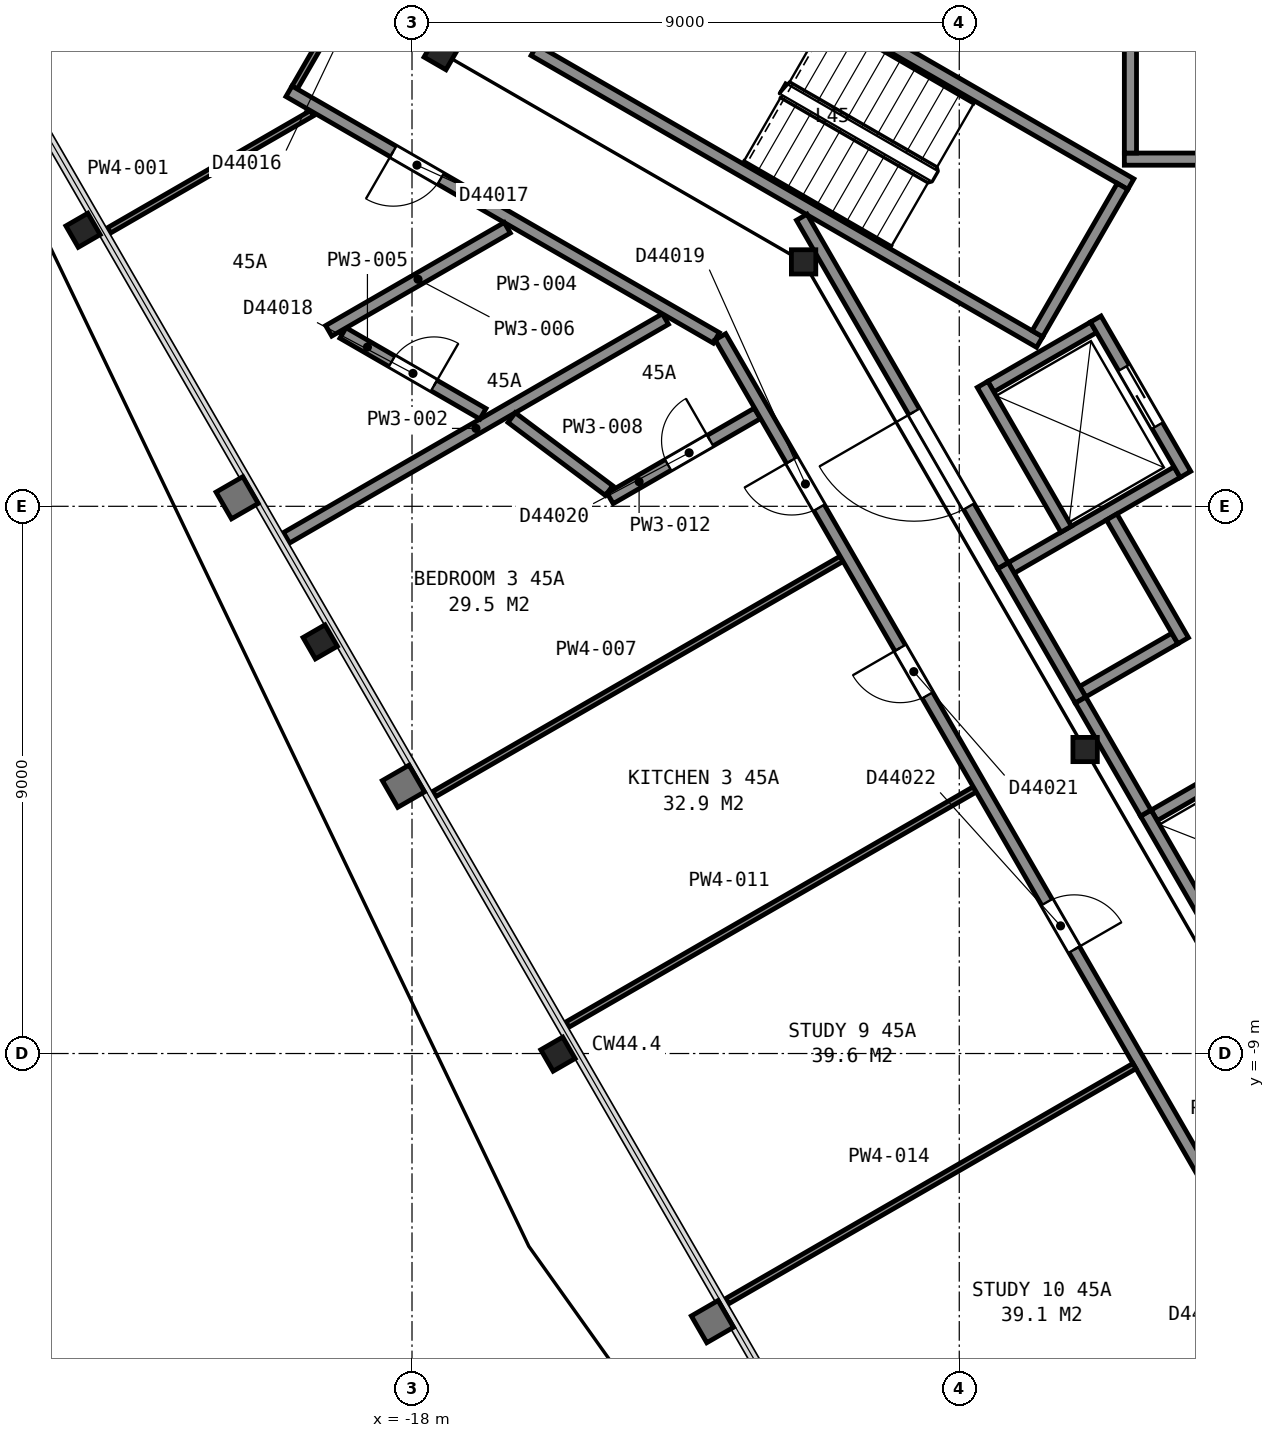
"""IFC4 building model, lengths in metres.
Left out: names, types, materials, properties, quantities, classifications, styles, units other than length and angle.
Written with IfcOpenShell. Run it as: python <this file> out.ifc"""

import sys

from ifc_helpers import new_model, si_unit, direction, frame, frame_2d, origin, origin_2d, place, context, subcontext, project, spatial, rectangle, i_section, extrude, element, fill, save


model = new_model("IFC4")
c1 = context("Model", 3, precision=1e-05, world=origin(), true_north=direction((0.0, 1.0)))
c2 = subcontext(c1, "Body", "Model", "MODEL_VIEW")
j1 = project(units=[si_unit("LENGTHUNIT", "METRE"), si_unit("PLANEANGLEUNIT", "RADIAN")], contexts=[c1])
p1 = place(None, origin())
s1 = spatial("IfcSite", under=j1, at=p1, CompositionType="ELEMENT")
p2 = place(p1, origin())
s2 = spatial("IfcBuilding", under=s1, at=p2, CompositionType="ELEMENT")
p3 = place(p2, frame((0.0, 0.0, 182.1)))
s3 = spatial("IfcBuildingStorey", under=s2, at=p3, CompositionType="ELEMENT", Elevation=182.1)
p4 = place(p3, frame((-23.41, 4.54, 0.0), z_axis=(0.0, 0.0, 1.0), x_axis=(-0.5, 0.866025403784, 0.0)))
e1 = element("IfcColumn", 1, at=p4, inside=s3, PredefinedType="COLUMN", context=c2, shape_type="SweptSolid", body=[
    extrude(i_section(OverallWidth=0.406, OverallDepth=0.417, WebThickness=0.03, FlangeThickness=0.048, FilletRadius=0.015, at=origin_2d()), origin(), (0.0, 0.0, 1.0), 3.66),
])
p5 = place(p3, frame((-19.51, -2.23, 0.0), z_axis=(0.0, 0.0, 1.0), x_axis=(-0.5, 0.866025403784, 0.0)))
e2 = element("IfcColumn", 2, at=p5, inside=s3, PredefinedType="COLUMN", context=c2, shape_type="SweptSolid", body=[
    extrude(i_section(OverallWidth=0.406, OverallDepth=0.417, WebThickness=0.03, FlangeThickness=0.048, FilletRadius=0.015, at=origin_2d()), origin(), (0.0, 0.0, 1.0), 3.665),
])
p6 = place(p3, frame((-15.6, -9.01, 0.0), z_axis=(0.0, 0.0, 1.0), x_axis=(-0.5, 0.866025403784, 0.0)))
e3 = element("IfcColumn", 3, at=p6, inside=s3, PredefinedType="COLUMN", context=c2, shape_type="SweptSolid", body=[
    extrude(i_section(OverallWidth=0.406, OverallDepth=0.417, WebThickness=0.03, FlangeThickness=0.048, FilletRadius=0.015, at=origin_2d()), origin(), (0.0, 0.0, 1.0), 3.67),
])
p7 = place(p3, frame((-17.52, 7.46, 0.0), z_axis=(0.0, 0.0, 1.0), x_axis=(0.5, 0.866025403784, 0.0)))
e4 = element("IfcColumn", 4, at=p7, inside=s3, PredefinedType="COLUMN", context=c2, shape_type="SweptSolid", body=[
    extrude(i_section(OverallWidth=0.406, OverallDepth=0.417, WebThickness=0.03, FlangeThickness=0.048, FilletRadius=0.015, at=origin_2d()), origin(), (0.0, 0.0, 1.0), 3.7),
])
for number, where, z_axis, x_axis in (
    (5, (-11.56, 4.02, 0.0), (0.0, 0.0, 1.0), (1.0, 0.0, 0.0)),
    (6, (-6.93, -4.0, 0.0), (0.0, 0.0, 1.0), (1.0, 0.0, 0.0)),
):
    element("IfcColumn", number, at=place(p3, frame(where, z_axis=z_axis, x_axis=x_axis)), inside=s3, PredefinedType="COLUMN", context=c2, shape_type="SweptSolid", body=[
        extrude(i_section(OverallWidth=0.401, OverallDepth=0.399, WebThickness=0.025, FlangeThickness=0.04, FilletRadius=0.015, at=origin_2d()), origin(), (0.0, 0.0, 1.0), 3.7),
    ])
for number, where, z_axis, x_axis in (
    (7, (-7.678, 2.701, 0.0), (0.0, 0.0, 1.0), (-0.866, 0.5, 0.0)),
    (8, (-6.178, 5.299, 0.0), (0.0, 0.0, 1.0), (-0.866, 0.5, 0.0)),
):
    element("IfcWall", number, at=place(p3, frame(where, z_axis=z_axis, x_axis=x_axis)), inside=s3, PredefinedType="PARTITIONING", context=c2, shape_type="SweptSolid", body=[
        extrude(rectangle(XDim=9.6, YDim=0.2, at=frame_2d((4.8, 0.0))), origin(), (0.0, 0.0, 1.0), 3.45),
    ])
p8 = place(p3, frame((-6.315, 5.262, 0.0), z_axis=(0.0, 0.0, 1.0), x_axis=(-0.500049511043, -0.865996816683, 0.0)))
e9 = element("IfcWall", 9, at=p8, inside=s3, PredefinedType="PARTITIONING", context=c2, shape_type="SweptSolid", body=[
    extrude(rectangle(XDim=2.8, YDim=0.2, at=frame_2d((1.4, 0.0))), origin(), (0.0, 0.0, 1.0), 3.45),
])
p9 = place(p3, frame((-6.285, 5.71, 0.0), z_axis=(0.0, 0.0, 1.0), x_axis=(1.0, 0.0, 0.0)))
e10 = element("IfcWall", 10, at=p9, inside=s3, PredefinedType="PARTITIONING", context=c2, shape_type="SweptSolid", body=[
    extrude(rectangle(XDim=2.35, YDim=0.2, at=frame_2d((1.175, 0.0))), origin(), (0.0, 0.0, 1.0), 3.7),
])
for number, where, z_axis, x_axis in (
    (11, (-5.795, -5.083, 0.0), (0.0, 0.0, 1.0), (0.866, 0.5, 0.0)),
    (12, (-6.97, -3.048, 0.0), (0.0, 0.0, 1.0), (0.866, 0.5, 0.0)),
):
    element("IfcWall", number, at=place(p3, frame(where, z_axis=z_axis, x_axis=x_axis)), inside=s3, PredefinedType="PARTITIONING", context=c2, shape_type="SweptSolid", body=[
        extrude(rectangle(XDim=1.75, YDim=0.2, at=frame_2d((0.875, 0.0))), origin(), (0.0, 0.0, 1.0), 3.7),
    ])
p10 = place(p3, frame((-8.145, -1.013, 0.0), z_axis=(0.0, 0.0, 1.0), x_axis=(0.866016494683, 0.500015430699, 0.0)))
e13 = element("IfcWall", 13, at=p10, inside=s3, PredefinedType="PARTITIONING", context=c2, shape_type="SweptSolid", body=[
    extrude(rectangle(XDim=3.15, YDim=0.2, at=frame_2d((1.575, 0.0))), origin(), (0.0, 0.0, 1.0), 3.7),
])
p11 = place(p3, frame((-8.48, 1.969, 0.0), z_axis=(0.0, 0.0, 1.0), x_axis=(0.866000020948, 0.500043961785, 0.0)))
e14 = element("IfcWall", 14, at=p11, inside=s3, PredefinedType="PARTITIONING", context=c2, shape_type="SweptSolid", body=[
    extrude(rectangle(XDim=1.95, YDim=0.2, at=frame_2d((0.975, 0.0))), origin(), (0.0, 0.0, 1.0), 3.7),
])
p12 = place(p3, frame((-6.185, 5.81, 0.0), z_axis=(0.0, 0.0, 1.0), x_axis=(0.0, 1.0, 0.0)))
e15 = element("IfcWall", 15, at=p12, inside=s3, PredefinedType="PARTITIONING", context=c2, shape_type="SweptSolid", body=[
    extrude(rectangle(XDim=1.75, YDim=0.2, at=frame_2d((0.875, 0.0))), origin(), (0.0, 0.0, 1.0), 3.7),
])
p13 = place(p3, frame((-5.28, 0.525, 0.0), z_axis=(0.0, 0.0, 1.0), x_axis=(-0.500037662692, 0.866003658127, 0.0)))
e16 = element("IfcWall", 16, at=p13, inside=s3, PredefinedType="PARTITIONING", context=c2, shape_type="SweptSolid", body=[
    extrude(rectangle(XDim=2.95, YDim=0.2, at=frame_2d((1.475, 0.0))), origin(), (0.0, 0.0, 1.0), 3.7),
])
p14 = place(p13, frame((0.925, 0.0, 0.0)))
e17 = element("IfcOpeningElement", 17, at=p14, cuts=e16, PredefinedType="OPENING", context=c2, shape_type="SweptSolid", body=[
    extrude(rectangle(XDim=1.1, YDim=2.1, at=frame_2d((0.55, 1.05))), frame((0.0, 0.11, 0.0), z_axis=(0.0, -1.0, 0.0), x_axis=(1.0, 0.0, 0.0)), (0.0, 0.0, 1.0), 0.22),
])
p15 = place(p3, frame((-5.318, -2.21, 0.0), z_axis=(0.0, 0.0, 1.0), x_axis=(-0.499938297808, 0.866061024631, 0.0)))
e18 = element("IfcWall", 18, at=p15, inside=s3, PredefinedType="PARTITIONING", context=c2, shape_type="SweptSolid", body=[
    extrude(rectangle(XDim=2.35, YDim=0.2, at=frame_2d((1.175, 0.0))), origin(), (0.0, 0.0, 1.0), 3.7),
])
p16 = place(p3, frame((-7.242, -0.376, 0.0), z_axis=(0.0, 0.0, 1.0), x_axis=(-0.499996545922, 0.866027397988, 0.0)))
e19 = element("IfcWall", 19, at=p16, inside=s3, PredefinedType="PARTITIONING", context=c2, shape_type="SweptSolid", body=[
    extrude(rectangle(XDim=2.75, YDim=0.2, at=frame_2d((1.375, 0.0))), origin(), (0.0, 0.0, 1.0), 3.7),
])
for number, where, z_axis, x_axis in (
    (20, (-4.656, -7.255, 0.0), (0.0, 0.0, 1.0), (-0.5, 0.866, 0.0)),
    (21, (-7.006, -3.185, 0.0), (0.0, 0.0, 1.0), (-0.5, 0.866, 0.0)),
):
    element("IfcWall", number, at=place(p3, frame(where, z_axis=z_axis, x_axis=x_axis)), inside=s3, PredefinedType="PARTITIONING", context=c2, shape_type="SweptSolid", body=[
        extrude(rectangle(XDim=2.55, YDim=0.2, at=frame_2d((1.275, 0.0))), origin(), (0.0, 0.0, 1.0), 3.7),
    ])
p17 = place(p3, frame((-11.591, 4.755, 0.0), z_axis=(0.0, 0.0, 1.0), x_axis=(0.500043977787, -0.866000011708, 0.0)))
e22 = element("IfcWall", 22, at=p17, inside=s3, PredefinedType="PARTITIONING", context=c2, shape_type="SweptSolid", body=[
    extrude(rectangle(XDim=6.617, YDim=0.2, at=frame_2d((3.308, 0.0))), origin(), (0.0, 0.0, 1.0), 3.45),
])
p18 = place(p17, frame((3.695, 0.0, 0.0)))
e23 = element("IfcOpeningElement", 23, at=p18, cuts=e22, PredefinedType="OPENING", context=c2, shape_type="SweptSolid", body=[
    extrude(rectangle(XDim=1.8, YDim=2.1, at=frame_2d((0.9, 1.05))), frame((0.0, 0.11, 0.0), z_axis=(0.0, -1.0, 0.0), x_axis=(1.0, 0.0, 0.0)), (0.0, 0.0, 1.0), 0.22),
])
p19 = place(p3, frame((-7.005, -3.187, 0.0), z_axis=(0.0, 0.0, 1.0), x_axis=(0.499689606989, -0.866204535123, 0.0)))
e24 = element("IfcWall", 24, at=p19, inside=s3, PredefinedType="PARTITIONING", context=c2, shape_type="SweptSolid", body=[
    extrude(rectangle(XDim=2.145, YDim=0.2, at=frame_2d((1.072, 0.0))), origin(), (0.0, 0.0, 1.0), 3.45),
])
p20 = place(p3, frame((-22.983, 4.538, 0.0), z_axis=(0.0, 0.0, 1.0), x_axis=(0.865988254995, 0.500064338071, 0.0)))
e25 = element("IfcWall", 25, at=p20, inside=s3, PredefinedType="PARTITIONING", context=c2, shape_type="SweptSolid", body=[
    extrude(rectangle(XDim=3.853, YDim=0.1, at=frame_2d((1.927, 0.0))), origin(), (0.0, 0.0, 1.0), 2.713),
])
p21 = place(p3, frame((-20.064, -0.518, 0.0), z_axis=(0.0, 0.0, 1.0), x_axis=(0.865994046034, 0.500054309285, 0.0)))
e26 = element("IfcWall", 26, at=p21, inside=s3, PredefinedType="PARTITIONING", context=c2, shape_type="SweptSolid", body=[
    extrude(rectangle(XDim=7.196, YDim=0.2, at=frame_2d((3.598, 0.0))), origin(), (0.0, 0.0, 1.0), 2.713),
])
p22 = place(p3, frame((-19.93, 6.888, 0.0), z_axis=(0.0, 0.0, 1.0), x_axis=(0.500413056211, 0.865786794294, 0.0)))
e27 = element("IfcWall", 27, at=p22, inside=s3, PredefinedType="PARTITIONING", context=c2, shape_type="SweptSolid", body=[
    extrude(rectangle(XDim=8.047, YDim=0.1, at=frame_2d((4.023, 0.0))), origin(), (0.0, 0.0, 1.0), 2.713),
])
p23 = place(p22, frame((3.4, 0.0, 0.0)))
e28 = element("IfcOpeningElement", 28, at=p23, cuts=e27, PredefinedType="OPENING", context=c2, shape_type="SweptSolid", body=[
    extrude(rectangle(XDim=1.2, YDim=2.1, at=frame_2d((0.6, 1.05))), frame((0.0, 0.06, 0.0), z_axis=(0.0, -1.0, 0.0), x_axis=(1.0, 0.0, 0.0)), (0.0, 0.0, 1.0), 0.12),
])
p24 = place(p3, frame((-12.995, 2.77, 0.0), z_axis=(0.0, 0.0, 1.0), x_axis=(-0.866100425926, 0.499870035319, 0.0)))
e29 = element("IfcWall", 29, at=p24, inside=s3, PredefinedType="PARTITIONING", context=c2, shape_type="SweptSolid", body=[
    extrude(rectangle(XDim=8.115, YDim=0.2, at=frame_2d((4.058, 0.0))), origin(), (0.0, 0.0, 1.0), 2.713),
])
p25 = place(p24, frame((5.235, 0.0, 0.0)))
e30 = element("IfcOpeningElement", 30, at=p25, cuts=e29, PredefinedType="OPENING", context=c2, shape_type="SweptSolid", body=[
    extrude(rectangle(XDim=0.9, YDim=2.1, at=frame_2d((0.45, 1.05))), frame((0.0, 0.11, 0.0), z_axis=(0.0, -1.0, 0.0), x_axis=(1.0, 0.0, 0.0)), (0.0, 0.0, 1.0), 0.22),
])
p26 = place(p3, frame((-19.136, 2.851, 0.0), z_axis=(0.0, 0.0, 1.0), x_axis=(0.866008217664, -0.500029766052, 0.0)))
e31 = element("IfcWall", 31, at=p26, inside=s3, PredefinedType="PARTITIONING", context=c2, shape_type="SweptSolid", body=[
    extrude(rectangle(XDim=2.659, YDim=0.2, at=frame_2d((1.33, 0.0))), origin(), (0.0, 0.0, 1.0), 2.713),
])
p27 = place(p26, frame((0.93, 0.0, 0.0)))
e32 = element("IfcOpeningElement", 32, at=p27, cuts=e31, PredefinedType="OPENING", context=c2, shape_type="SweptSolid", body=[
    extrude(rectangle(XDim=0.8, YDim=2.1, at=frame_2d((0.4, 1.05))), frame((0.0, 0.11, 0.0), z_axis=(0.0, -1.0, 0.0), x_axis=(1.0, 0.0, 0.0)), (0.0, 0.0, 1.0), 0.22),
])
p28 = place(p3, frame((-19.37, 2.886, 0.0), z_axis=(0.0, 0.0, 1.0), x_axis=(0.866036909293, 0.499980071345, 0.0)))
e33 = element("IfcWall", 33, at=p28, inside=s3, PredefinedType="PARTITIONING", context=c2, shape_type="SweptSolid", body=[
    extrude(rectangle(XDim=3.391, YDim=0.2, at=frame_2d((1.695, 0.0))), origin(), (0.0, 0.0, 1.0), 2.713),
])
p29 = place(p3, frame((-17.632, -4.731, 0.0), z_axis=(0.0, 0.0, 1.0), x_axis=(0.866002098189, 0.500040364304, 0.0)))
e34 = element("IfcWall", 34, at=p29, inside=s3, PredefinedType="PARTITIONING", context=c2, shape_type="SweptSolid", body=[
    extrude(rectangle(XDim=7.733, YDim=0.1, at=frame_2d((3.867, 0.0))), origin(), (0.0, 0.0, 1.0), 2.713),
])
p30 = place(p3, frame((-16.362, 1.459, 0.0), z_axis=(0.0, 0.0, 1.0), x_axis=(0.800219351666, -0.59970741968, 0.0)))
e35 = element("IfcWall", 35, at=p30, inside=s3, PredefinedType="PARTITIONING", context=c2, shape_type="SweptSolid", body=[
    extrude(rectangle(XDim=2.003, YDim=0.2, at=frame_2d((1.001, 0.0))), origin(), (0.0, 0.0, 1.0), 2.713),
])
p31 = place(p3, frame((-15.442, -8.523, 0.0), z_axis=(0.0, 0.0, 1.0), x_axis=(0.866007875589, 0.500030358497, 0.0)))
e36 = element("IfcWall", 36, at=p31, inside=s3, PredefinedType="PARTITIONING", context=c2, shape_type="SweptSolid", body=[
    extrude(rectangle(XDim=7.733, YDim=0.1, at=frame_2d((3.866, 0.0))), origin(), (0.0, 0.0, 1.0), 2.713),
])
p32 = place(p3, frame((-14.742, 0.13, 0.0), z_axis=(0.0, 0.0, 1.0), x_axis=(0.866003766563, 0.500037474894, 0.0)))
e37 = element("IfcWall", 37, at=p32, inside=s3, PredefinedType="PARTITIONING", context=c2, shape_type="SweptSolid", body=[
    extrude(rectangle(XDim=2.795, YDim=0.2, at=frame_2d((1.397, 0.0))), origin(), (0.0, 0.0, 1.0), 2.713),
])
p33 = place(p32, frame((1.1, 0.0, 0.0)))
e38 = element("IfcOpeningElement", 38, at=p33, cuts=e37, PredefinedType="OPENING", context=c2, shape_type="SweptSolid", body=[
    extrude(rectangle(XDim=0.8, YDim=2.1, at=frame_2d((0.4, 1.05))), frame((0.0, 0.11, 0.0), z_axis=(0.0, -1.0, 0.0), x_axis=(1.0, 0.0, 0.0)), (0.0, 0.0, 1.0), 0.22),
])
p34 = place(p3, frame((-4.075, -12.545, 0.0), z_axis=(0.0, 0.0, 1.0), x_axis=(-0.499997769292, 0.86602669168, 0.0)))
e39 = element("IfcWall", 39, at=p34, inside=s3, PredefinedType="PARTITIONING", context=c2, shape_type="SweptSolid", body=[
    extrude(rectangle(XDim=17.706, YDim=0.2, at=frame_2d((8.853, 0.0))), origin(), (0.0, 0.0, 1.0), 2.713),
])
p35 = place(p34, frame((14.46, 0.0, 0.0)))
e40 = element("IfcOpeningElement", 40, at=p35, cuts=e39, PredefinedType="OPENING", context=c2, shape_type="SweptSolid", body=[
    extrude(rectangle(XDim=0.9, YDim=2.1, at=frame_2d((0.45, 1.05))), frame((0.0, 0.11, 0.0), z_axis=(0.0, -1.0, 0.0), x_axis=(1.0, 0.0, 0.0)), (0.0, 0.0, 1.0), 0.22),
])
p36 = place(p34, frame((10.896, 0.0, 0.0)))
e41 = element("IfcOpeningElement", 41, at=p36, cuts=e39, PredefinedType="OPENING", context=c2, shape_type="SweptSolid", body=[
    extrude(rectangle(XDim=0.9, YDim=2.1, at=frame_2d((0.45, 1.05))), frame((0.0, 0.11, 0.0), z_axis=(0.0, -1.0, 0.0), x_axis=(1.0, 0.0, 0.0)), (0.0, 0.0, 1.0), 0.22),
])
p37 = place(p34, frame((6.068, 0.0, 0.0)))
e42 = element("IfcOpeningElement", 42, at=p37, cuts=e39, PredefinedType="OPENING", context=c2, shape_type="SweptSolid", body=[
    extrude(rectangle(XDim=0.9, YDim=2.1, at=frame_2d((0.45, 1.05))), frame((0.0, 0.11, 0.0), z_axis=(0.0, -1.0, 0.0), x_axis=(1.0, 0.0, 0.0)), (0.0, 0.0, 1.0), 0.22),
])
p38 = place(p3, frame((-12.815, -13.073, 0.0), z_axis=(0.0, 0.0, 1.0), x_axis=(0.866007875589, 0.500030358497, 0.0)))
e43 = element("IfcWall", 43, at=p38, inside=s3, PredefinedType="PARTITIONING", context=c2, shape_type="SweptSolid", body=[
    extrude(rectangle(XDim=7.733, YDim=0.1, at=frame_2d((3.866, 0.0))), origin(), (0.0, 0.0, 1.0), 2.713),
])
p39 = place(p14, origin())
e44 = element("IfcDoor", 44, at=p39, inside=s3, OperationType="SLIDING_TO_LEFT", PredefinedType="DOOR", context=c2, shape_type="SweptSolid", body=[
    extrude(rectangle(XDim=1.1, YDim=2.1, at=frame_2d((0.55, 1.05))), frame((0.0, 0.025, 0.0), z_axis=(0.0, -1.0, 0.0), x_axis=(1.0, 0.0, 0.0)), (0.0, 0.0, 1.0), 0.05),
])
fill(e17, e44)
p40 = place(p18, origin())
e45 = element("IfcDoor", 45, at=p40, inside=s3, OperationType="DOUBLE_DOOR_SINGLE_SWING", PredefinedType="DOOR", context=c2, shape_type="SweptSolid", body=[
    extrude(rectangle(XDim=1.8, YDim=2.1, at=frame_2d((0.9, 1.05))), frame((0.0, 0.025, 0.0), z_axis=(0.0, -1.0, 0.0), x_axis=(1.0, 0.0, 0.0)), (0.0, 0.0, 1.0), 0.05),
])
fill(e23, e45)
p41 = place(p25, origin())
e46 = element("IfcDoor", 46, at=p41, inside=s3, OperationType="SINGLE_SWING_RIGHT", PredefinedType="DOOR", context=c2, shape_type="SweptSolid", body=[
    extrude(rectangle(XDim=0.9, YDim=2.1, at=frame_2d((0.45, 1.05))), frame((0.0, 0.025, 0.0), z_axis=(0.0, -1.0, 0.0), x_axis=(1.0, 0.0, 0.0)), (0.0, 0.0, 1.0), 0.05),
])
fill(e30, e46)
p42 = place(p27, origin())
e47 = element("IfcDoor", 47, at=p42, inside=s3, OperationType="SINGLE_SWING_RIGHT", PredefinedType="DOOR", context=c2, shape_type="SweptSolid", body=[
    extrude(rectangle(XDim=0.8, YDim=2.1, at=frame_2d((0.4, 1.05))), frame((0.0, 0.025, 0.0), z_axis=(0.0, -1.0, 0.0), x_axis=(1.0, 0.0, 0.0)), (0.0, 0.0, 1.0), 0.05),
])
fill(e32, e47)
p43 = place(p33, origin())
e48 = element("IfcDoor", 48, at=p43, inside=s3, OperationType="SINGLE_SWING_RIGHT", PredefinedType="DOOR", context=c2, shape_type="SweptSolid", body=[
    extrude(rectangle(XDim=0.8, YDim=2.1, at=frame_2d((0.4, 1.05))), frame((0.0, 0.025, 0.0), z_axis=(0.0, -1.0, 0.0), x_axis=(1.0, 0.0, 0.0)), (0.0, 0.0, 1.0), 0.05),
])
fill(e38, e48)
p44 = place(p35, origin())
e49 = element("IfcDoor", 49, at=p44, inside=s3, OperationType="SINGLE_SWING_RIGHT", PredefinedType="DOOR", context=c2, shape_type="SweptSolid", body=[
    extrude(rectangle(XDim=0.9, YDim=2.1, at=frame_2d((0.45, 1.05))), frame((0.0, 0.025, 0.0), z_axis=(0.0, -1.0, 0.0), x_axis=(1.0, 0.0, 0.0)), (0.0, 0.0, 1.0), 0.05),
])
fill(e40, e49)
p45 = place(p36, origin())
e50 = element("IfcDoor", 50, at=p45, inside=s3, OperationType="SINGLE_SWING_RIGHT", PredefinedType="DOOR", context=c2, shape_type="SweptSolid", body=[
    extrude(rectangle(XDim=0.9, YDim=2.1, at=frame_2d((0.45, 1.05))), frame((0.0, 0.025, 0.0), z_axis=(0.0, -1.0, 0.0), x_axis=(1.0, 0.0, 0.0)), (0.0, 0.0, 1.0), 0.05),
])
fill(e41, e50)
p46 = place(p37, origin())
e51 = element("IfcDoor", 51, at=p46, inside=s3, OperationType="SINGLE_SWING_LEFT", PredefinedType="DOOR", context=c2, shape_type="SweptSolid", body=[
    extrude(rectangle(XDim=0.9, YDim=2.1, at=frame_2d((0.45, 1.05))), frame((0.0, 0.025, 0.0), z_axis=(0.0, -1.0, 0.0), x_axis=(1.0, 0.0, 0.0)), (0.0, 0.0, 1.0), 0.05),
])
fill(e42, e51)
save(model, sys.argv[1])
